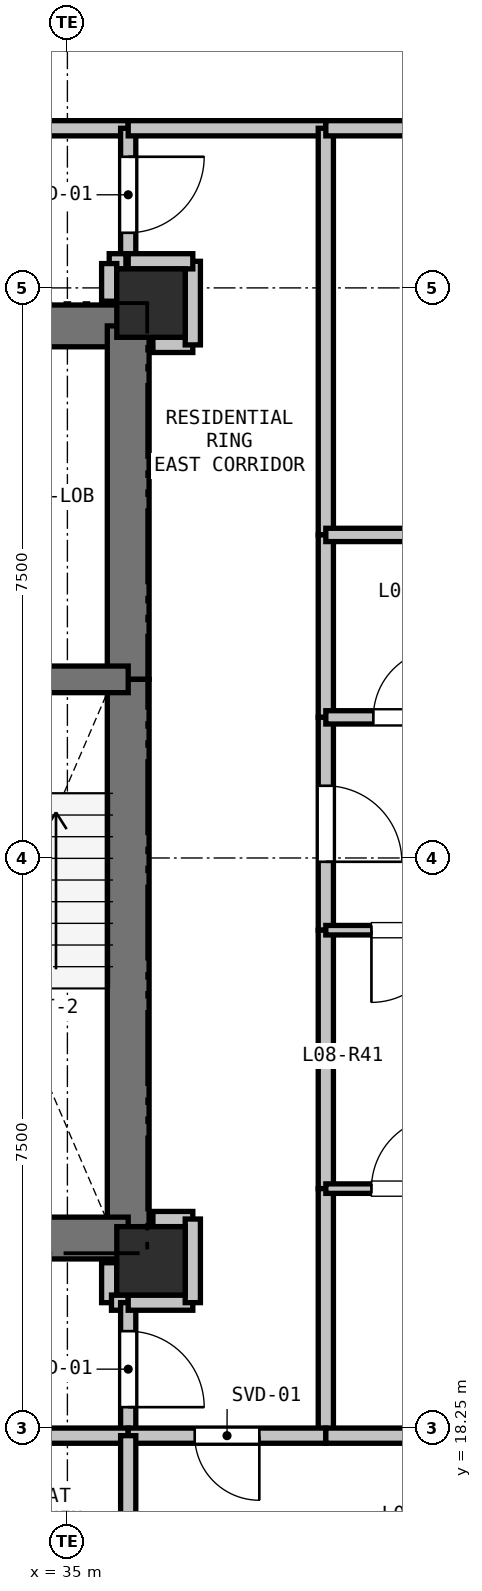
"""IFC4 building model, lengths in metres.
Left out: names, types, materials, properties, quantities, classifications, styles, units other than length and angle.
Written with IfcOpenShell. Run it as: python <this file> out.ifc"""

import sys

from ifc_helpers import new_model, si_unit, direction, frame, frame_2d, origin, origin_2d, place, context, subcontext, project, spatial, rectangle, extrude, element, fill, save


model = new_model("IFC4")
c1 = context("Model", 3, precision=1e-05, world=origin(), true_north=direction((0.0, 1.0)))
c2 = subcontext(c1, "Body", "Model", "MODEL_VIEW")
j1 = project(units=[si_unit("LENGTHUNIT", "METRE"), si_unit("PLANEANGLEUNIT", "RADIAN")], contexts=[c1])
p1 = place(None, origin())
s1 = spatial("IfcSite", under=j1, at=p1, CompositionType="ELEMENT")
p2 = place(p1, origin())
s2 = spatial("IfcBuilding", under=s1, at=p2, CompositionType="ELEMENT")
p3 = place(p2, frame((0.0, 0.0, 32.4)))
s3 = spatial("IfcBuildingStorey", under=s2, at=p3, CompositionType="ELEMENT", Elevation=32.4)
for number, where, z_axis, x_axis in (
    (1, (36.1, 33.05, 0.0), (0.0, 0.0, 1.0), (1.0, 0.0, 0.0)),
    (2, (36.1, 20.45, 0.0), (0.0, 0.0, 1.0), (1.0, 0.0, 0.0)),
):
    element("IfcColumn", number, at=place(p3, frame(where, z_axis=z_axis, x_axis=x_axis)), inside=s3, PredefinedType="COLUMN", context=c2, shape_type="SweptSolid", body=[
        extrude(rectangle(XDim=0.9, YDim=0.9, at=origin_2d()), origin(), (0.0, 0.0, 1.0), 3.3),
    ])
p4 = place(p3, frame((32.35, 32.75, 0.0), z_axis=(0.0, 0.0, 1.0), x_axis=(1.0, 0.0, 0.0)))
e3 = element("IfcWall", 3, at=p4, inside=s3, PredefinedType="SHEAR", context=c2, shape_type="SweptSolid", body=[
    extrude(rectangle(XDim=3.45, YDim=0.55, at=frame_2d((1.725, 0.0))), origin(), (0.0, 0.0, 1.0), 3.04),
])
p5 = place(p4, frame((0.65, 0.0, 0.0)))
e4 = element("IfcOpeningElement", 4, at=p5, cuts=e3, PredefinedType="OPENING", context=c2, shape_type="SweptSolid", body=[
    extrude(rectangle(XDim=1.15, YDim=2.15, at=frame_2d((0.575, 1.075))), frame((0.0, 0.285, 0.0), z_axis=(0.0, -1.0, 0.0), x_axis=(1.0, 0.0, 0.0)), (0.0, 0.0, 1.0), 0.57),
])
p6 = place(p3, frame((35.8, 32.75, 0.0), z_axis=(0.0, 0.0, 1.0), x_axis=(0.0, -1.0, 0.0)))
e5 = element("IfcWall", 5, at=p6, inside=s3, PredefinedType="SHEAR", context=c2, shape_type="SweptSolid", body=[
    extrude(rectangle(XDim=4.65, YDim=0.55, at=frame_2d((2.325, 0.0))), origin(), (0.0, 0.0, 1.0), 3.04),
])
p7 = place(p3, frame((35.8, 28.1, 0.0), z_axis=(0.0, 0.0, 1.0), x_axis=(0.0, -1.0, 0.0)))
e6 = element("IfcWall", 6, at=p7, inside=s3, PredefinedType="SHEAR", context=c2, shape_type="SweptSolid", body=[
    extrude(rectangle(XDim=7.35, YDim=0.55, at=frame_2d((3.675, 0.0))), origin(), (0.0, 0.0, 1.0), 3.04),
])
p8 = place(p3, frame((35.8, 20.75, 0.0), z_axis=(0.0, 0.0, 1.0), x_axis=(-1.0, 0.0, 0.0)))
e7 = element("IfcWall", 7, at=p8, inside=s3, PredefinedType="SHEAR", context=c2, shape_type="SweptSolid", body=[
    extrude(rectangle(XDim=3.45, YDim=0.55, at=frame_2d((1.725, 0.0))), origin(), (0.0, 0.0, 1.0), 3.04),
])
p9 = place(p3, frame((32.35, 28.1, 0.0), z_axis=(0.0, 0.0, 1.0), x_axis=(1.0, 0.0, 0.0)))
e8 = element("IfcWall", 8, at=p9, inside=s3, PredefinedType="SHEAR", context=c2, shape_type="SweptSolid", body=[
    extrude(rectangle(XDim=3.45, YDim=0.35, at=frame_2d((1.725, 0.0))), origin(), (0.0, 0.0, 1.0), 3.04),
])
p10 = place(p9, frame((1.15, 0.0, 0.0)))
e9 = element("IfcOpeningElement", 9, at=p10, cuts=e8, PredefinedType="OPENING", context=c2, shape_type="SweptSolid", body=[
    extrude(rectangle(XDim=1.15, YDim=2.15, at=frame_2d((0.575, 1.075))), frame((0.0, 0.185, 0.0), z_axis=(0.0, -1.0, 0.0), x_axis=(1.0, 0.0, 0.0)), (0.0, 0.0, 1.0), 0.37),
])
p11 = place(p3, frame((35.55, 20.425, 0.0), z_axis=(0.0, 0.0, 1.0), x_axis=(0.0, -1.0, 0.0)))
e10 = element("IfcWall", 10, at=p11, inside=s3, PredefinedType="PARTITIONING", context=c2, shape_type="SweptSolid", body=[
    extrude(rectangle(XDim=0.525, YDim=0.2, at=frame_2d((0.263, 0.0))), origin(), (0.0, 0.0, 1.0), 2.488),
])
p12 = place(p3, frame((35.58, 19.9, 0.0), z_axis=(0.0, 0.0, 1.0), x_axis=(1.0, 0.0, 0.0)))
e11 = element("IfcWall", 11, at=p12, inside=s3, PredefinedType="PARTITIONING", context=c2, shape_type="SweptSolid", body=[
    extrude(rectangle(XDim=0.22, YDim=0.2, at=frame_2d((0.11, 0.0))), origin(), (0.0, 0.0, 1.0), 3.04),
])
p13 = place(p3, frame((35.8, 19.9, 0.0), z_axis=(0.0, 0.0, 1.0), x_axis=(0.0, -1.0, 0.0)))
e12 = element("IfcWall", 12, at=p13, inside=s3, PredefinedType="PARTITIONING", context=c2, shape_type="SweptSolid", body=[
    extrude(rectangle(XDim=1.75, YDim=0.2, at=frame_2d((0.875, 0.0))), origin(), (0.0, 0.0, 1.0), 3.04),
])
p14 = place(p13, frame((0.375, 0.0, 0.0)))
e13 = element("IfcOpeningElement", 13, at=p14, cuts=e12, PredefinedType="OPENING", context=c2, shape_type="SweptSolid", body=[
    extrude(rectangle(XDim=1.0, YDim=2.15, at=frame_2d((0.5, 1.075))), frame((0.0, 0.11, 0.0), z_axis=(0.0, -1.0, 0.0), x_axis=(1.0, 0.0, 0.0)), (0.0, 0.0, 1.0), 0.22),
])
p15 = place(p3, frame((35.8, 18.15, 0.0), z_axis=(0.0, 0.0, 1.0), x_axis=(-1.0, 0.0, 0.0)))
e14 = element("IfcWall", 14, at=p15, inside=s3, PredefinedType="PARTITIONING", context=c2, shape_type="SweptSolid", body=[
    extrude(rectangle(XDim=3.6, YDim=0.2, at=frame_2d((1.8, 0.0))), origin(), (0.0, 0.0, 1.0), 3.04),
])
p16 = place(p3, frame((33.5, 35.35, 0.0), z_axis=(0.0, 0.0, 1.0), x_axis=(1.0, 0.0, 0.0)))
e15 = element("IfcWall", 15, at=p16, inside=s3, PredefinedType="PARTITIONING", context=c2, shape_type="SweptSolid", body=[
    extrude(rectangle(XDim=2.3, YDim=0.2, at=frame_2d((1.15, 0.0))), origin(), (0.0, 0.0, 1.0), 3.04),
])
p17 = place(p3, frame((35.8, 35.35, 0.0), z_axis=(0.0, 0.0, 1.0), x_axis=(0.0, -1.0, 0.0)))
e16 = element("IfcWall", 16, at=p17, inside=s3, PredefinedType="PARTITIONING", context=c2, shape_type="SweptSolid", body=[
    extrude(rectangle(XDim=1.75, YDim=0.2, at=frame_2d((0.875, 0.0))), origin(), (0.0, 0.0, 1.0), 3.04),
])
p18 = place(p17, frame((0.375, 0.0, 0.0)))
e17 = element("IfcOpeningElement", 17, at=p18, cuts=e16, PredefinedType="OPENING", context=c2, shape_type="SweptSolid", body=[
    extrude(rectangle(XDim=1.0, YDim=2.15, at=frame_2d((0.5, 1.075))), frame((0.0, 0.11, 0.0), z_axis=(0.0, -1.0, 0.0), x_axis=(1.0, 0.0, 0.0)), (0.0, 0.0, 1.0), 0.22),
])
p19 = place(p3, frame((35.77, 33.6, 0.0), z_axis=(0.0, 0.0, 1.0), x_axis=(-1.0, 0.0, 0.0)))
e18 = element("IfcWall", 18, at=p19, inside=s3, PredefinedType="PARTITIONING", context=c2, shape_type="SweptSolid", body=[
    extrude(rectangle(XDim=0.22, YDim=0.2, at=frame_2d((0.11, 0.0))), origin(), (0.0, 0.0, 1.0), 3.04),
])
p20 = place(p3, frame((35.55, 33.57, 0.0), z_axis=(0.0, 0.0, 1.0), x_axis=(0.0, -1.0, 0.0)))
e19 = element("IfcWall", 19, at=p20, inside=s3, PredefinedType="PARTITIONING", context=c2, shape_type="SweptSolid", body=[
    extrude(rectangle(XDim=0.495, YDim=0.2, at=frame_2d((0.248, 0.0))), origin(), (0.0, 0.0, 1.0), 2.488),
])
for number, where, z_axis, x_axis in (
    (20, (36.65, 21.0, 0.0), (0.0, 0.0, 1.0), (-1.0, 0.0, 0.0)),
    (21, (36.125, 32.5, 0.0), (0.0, 0.0, 1.0), (1.0, 0.0, 0.0)),
):
    element("IfcWall", number, at=place(p3, frame(where, z_axis=z_axis, x_axis=x_axis)), inside=s3, PredefinedType="PARTITIONING", context=c2, shape_type="SweptSolid", body=[
        extrude(rectangle(XDim=0.525, YDim=0.2, at=frame_2d((0.262, 0.0))), origin(), (0.0, 0.0, 1.0), 2.488),
    ])
p21 = place(p3, frame((36.65, 32.5, 0.0), z_axis=(0.0, 0.0, 1.0), x_axis=(0.0, 1.0, 0.0)))
e22 = element("IfcWall", 22, at=p21, inside=s3, PredefinedType="PARTITIONING", context=c2, shape_type="SweptSolid", body=[
    extrude(rectangle(XDim=1.1, YDim=0.2, at=frame_2d((0.55, 0.0))), origin(), (0.0, 0.0, 1.0), 2.338),
])
p22 = place(p3, frame((36.65, 33.6, 0.0), z_axis=(0.0, 0.0, 1.0), x_axis=(-1.0, 0.0, 0.0)))
e23 = element("IfcWall", 23, at=p22, inside=s3, PredefinedType="PARTITIONING", context=c2, shape_type="SweptSolid", body=[
    extrude(rectangle(XDim=0.85, YDim=0.2, at=frame_2d((0.425, 0.0))), origin(), (0.0, 0.0, 1.0), 2.338),
])
p23 = place(p3, frame((35.8, 35.35, 0.0), z_axis=(0.0, 0.0, 1.0), x_axis=(1.0, 0.0, 0.0)))
e24 = element("IfcWall", 24, at=p23, inside=s3, PredefinedType="PARTITIONING", context=c2, shape_type="SweptSolid", body=[
    extrude(rectangle(XDim=2.6, YDim=0.2, at=frame_2d((1.3, 0.0))), origin(), (0.0, 0.0, 1.0), 2.338),
])
p24 = place(p3, frame((38.4, 35.35, 0.0), z_axis=(0.0, 0.0, 1.0), x_axis=(0.0, -1.0, 0.0)))
e25 = element("IfcWall", 25, at=p24, inside=s3, PredefinedType="PARTITIONING", context=c2, shape_type="SweptSolid", body=[
    extrude(rectangle(XDim=5.35, YDim=0.2, at=frame_2d((2.675, 0.0))), origin(), (0.0, 0.0, 1.0), 2.338),
])
p25 = place(p3, frame((38.4, 30.0, 0.0), z_axis=(0.0, 0.0, 1.0), x_axis=(0.0, -1.0, 0.0)))
e26 = element("IfcWall", 26, at=p25, inside=s3, PredefinedType="PARTITIONING", context=c2, shape_type="SweptSolid", body=[
    extrude(rectangle(XDim=2.4, YDim=0.2, at=frame_2d((1.2, 0.0))), origin(), (0.0, 0.0, 1.0), 3.04),
])
p26 = place(p3, frame((38.4, 27.6, 0.0), z_axis=(0.0, 0.0, 1.0), x_axis=(0.0, -1.0, 0.0)))
e27 = element("IfcWall", 27, at=p26, inside=s3, PredefinedType="PARTITIONING", context=c2, shape_type="SweptSolid", body=[
    extrude(rectangle(XDim=2.8, YDim=0.2, at=frame_2d((1.4, 0.0))), origin(), (0.0, 0.0, 1.0), 3.04),
])
p27 = place(p26, frame((0.9, 0.0, 0.0)))
e28 = element("IfcOpeningElement", 28, at=p27, cuts=e27, PredefinedType="OPENING", context=c2, shape_type="SweptSolid", body=[
    extrude(rectangle(XDim=1.0, YDim=2.15, at=frame_2d((0.5, 1.075))), frame((0.0, 0.11, 0.0), z_axis=(0.0, -1.0, 0.0), x_axis=(1.0, 0.0, 0.0)), (0.0, 0.0, 1.0), 0.22),
])
p28 = place(p3, frame((38.4, 24.8, 0.0), z_axis=(0.0, 0.0, 1.0), x_axis=(0.0, -1.0, 0.0)))
e29 = element("IfcWall", 29, at=p28, inside=s3, PredefinedType="PARTITIONING", context=c2, shape_type="SweptSolid", body=[
    extrude(rectangle(XDim=3.4, YDim=0.2, at=frame_2d((1.7, 0.0))), origin(), (0.0, 0.0, 1.0), 3.04),
])
p29 = place(p3, frame((38.4, 21.4, 0.0), z_axis=(0.0, 0.0, 1.0), x_axis=(0.0, -1.0, 0.0)))
e30 = element("IfcWall", 30, at=p29, inside=s3, PredefinedType="PARTITIONING", context=c2, shape_type="SweptSolid", body=[
    extrude(rectangle(XDim=3.25, YDim=0.2, at=frame_2d((1.625, 0.0))), origin(), (0.0, 0.0, 1.0), 3.04),
])
p30 = place(p3, frame((38.4, 18.15, 0.0), z_axis=(0.0, 0.0, 1.0), x_axis=(-1.0, 0.0, 0.0)))
e31 = element("IfcWall", 31, at=p30, inside=s3, PredefinedType="PARTITIONING", context=c2, shape_type="SweptSolid", body=[
    extrude(rectangle(XDim=2.6, YDim=0.2, at=frame_2d((1.3, 0.0))), origin(), (0.0, 0.0, 1.0), 2.338),
])
p31 = place(p30, frame((0.875, 0.0, 0.0)))
e32 = element("IfcOpeningElement", 32, at=p31, cuts=e31, PredefinedType="OPENING", context=c2, shape_type="SweptSolid", body=[
    extrude(rectangle(XDim=0.85, YDim=2.1, at=frame_2d((0.425, 1.05))), frame((0.0, 0.11, 0.0), z_axis=(0.0, -1.0, 0.0), x_axis=(1.0, 0.0, 0.0)), (0.0, 0.0, 1.0), 0.22),
])
p32 = place(p3, frame((35.8, 19.9, 0.0), z_axis=(0.0, 0.0, 1.0), x_axis=(1.0, 0.0, 0.0)))
e33 = element("IfcWall", 33, at=p32, inside=s3, PredefinedType="PARTITIONING", context=c2, shape_type="SweptSolid", body=[
    extrude(rectangle(XDim=0.85, YDim=0.2, at=frame_2d((0.425, 0.0))), origin(), (0.0, 0.0, 1.0), 2.338),
])
p33 = place(p3, frame((36.65, 19.9, 0.0), z_axis=(0.0, 0.0, 1.0), x_axis=(0.0, 1.0, 0.0)))
e34 = element("IfcWall", 34, at=p33, inside=s3, PredefinedType="PARTITIONING", context=c2, shape_type="SweptSolid", body=[
    extrude(rectangle(XDim=1.1, YDim=0.2, at=frame_2d((0.55, 0.0))), origin(), (0.0, 0.0, 1.0), 3.04),
])
p34 = place(p3, frame((40.55, 24.8, 0.0), z_axis=(0.0, 0.0, 1.0), x_axis=(-1.0, 0.0, 0.0)))
e35 = element("IfcWall", 35, at=p34, inside=s3, PredefinedType="PARTITIONING", context=c2, shape_type="SweptSolid", body=[
    extrude(rectangle(XDim=2.15, YDim=0.125, at=frame_2d((1.075, 0.0))), origin(), (0.0, 0.0, 1.0), 3.04),
])
p35 = place(p34, frame((0.6, 0.0, 0.0)))
e36 = element("IfcOpeningElement", 36, at=p35, cuts=e35, PredefinedType="OPENING", context=c2, shape_type="SweptSolid", body=[
    extrude(rectangle(XDim=0.95, YDim=2.1, at=frame_2d((0.475, 1.05))), frame((0.0, 0.073, 0.0), z_axis=(0.0, -1.0, 0.0), x_axis=(1.0, 0.0, 0.0)), (0.0, 0.0, 1.0), 0.145),
])
p36 = place(p3, frame((38.4, 27.6, 0.0), z_axis=(0.0, 0.0, 1.0), x_axis=(1.0, 0.0, 0.0)))
e37 = element("IfcWall", 37, at=p36, inside=s3, PredefinedType="PLUMBINGWALL", context=c2, shape_type="SweptSolid", body=[
    extrude(rectangle(XDim=2.15, YDim=0.175, at=frame_2d((1.075, 0.0))), origin(), (0.0, 0.0, 1.0), 3.04),
])
p37 = place(p36, frame((0.625, 0.0, 0.0)))
e38 = element("IfcOpeningElement", 38, at=p37, cuts=e37, PredefinedType="OPENING", context=c2, shape_type="SweptSolid", body=[
    extrude(rectangle(XDim=0.9, YDim=2.1, at=frame_2d((0.45, 1.05))), frame((0.0, 0.097, 0.0), z_axis=(0.0, -1.0, 0.0), x_axis=(1.0, 0.0, 0.0)), (0.0, 0.0, 1.0), 0.195),
])
p38 = place(p3, frame((43.688, 35.35, 0.0), z_axis=(0.0, 0.0, 1.0), x_axis=(-1.0, 0.0, 0.0)))
e39 = element("IfcWall", 39, at=p38, inside=s3, PredefinedType="PARTITIONING", context=c2, shape_type="SweptSolid", body=[
    extrude(rectangle(XDim=5.289, YDim=0.2, at=frame_2d((2.644, 0.0))), origin(), (0.0, 0.0, 1.0), 2.338),
])
p39 = place(p3, frame((35.8, 18.15, 0.0), z_axis=(0.0, 0.0, 1.0), x_axis=(0.0, -1.0, 0.0)))
e40 = element("IfcWall", 40, at=p39, inside=s3, PredefinedType="PARTITIONING", context=c2, shape_type="SweptSolid", body=[
    extrude(rectangle(XDim=2.7, YDim=0.2, at=frame_2d((1.35, 0.0))), origin(), (0.0, 0.0, 1.0), 3.04),
])
p40 = place(p3, frame((38.4, 30.0, 0.0), z_axis=(0.0, 0.0, 1.0), x_axis=(1.0, 0.0, 0.0)))
e41 = element("IfcWall", 41, at=p40, inside=s3, PredefinedType="PLUMBINGWALL", context=c2, shape_type="SweptSolid", body=[
    extrude(rectangle(XDim=2.15, YDim=0.175, at=frame_2d((1.075, 0.0))), origin(), (0.0, 0.0, 1.0), 3.04),
])
p41 = place(p3, frame((38.4, 21.4, 0.0), z_axis=(0.0, 0.0, 1.0), x_axis=(1.0, 0.0, 0.0)))
e42 = element("IfcWall", 42, at=p41, inside=s3, PredefinedType="PARTITIONING", context=c2, shape_type="SweptSolid", body=[
    extrude(rectangle(XDim=2.15, YDim=0.125, at=frame_2d((1.075, 0.0))), origin(), (0.0, 0.0, 1.0), 3.04),
])
p42 = place(p41, frame((0.6, 0.0, 0.0)))
e43 = element("IfcOpeningElement", 43, at=p42, cuts=e42, PredefinedType="OPENING", context=c2, shape_type="SweptSolid", body=[
    extrude(rectangle(XDim=0.95, YDim=2.1, at=frame_2d((0.475, 1.05))), frame((0.0, 0.073, 0.0), z_axis=(0.0, -1.0, 0.0), x_axis=(1.0, 0.0, 0.0)), (0.0, 0.0, 1.0), 0.145),
])
p43 = place(p3, frame((43.688, 18.15, 0.0), z_axis=(0.0, 0.0, 1.0), x_axis=(-1.0, 0.0, 0.0)))
e44 = element("IfcWall", 44, at=p43, inside=s3, PredefinedType="PARTITIONING", context=c2, shape_type="SweptSolid", body=[
    extrude(rectangle(XDim=5.289, YDim=0.2, at=frame_2d((2.644, 0.0))), origin(), (0.0, 0.0, 1.0), 2.365),
])
p44 = place(p14, origin())
e45 = element("IfcDoor", 45, at=p44, inside=s3, OperationType="SINGLE_SWING_RIGHT", PredefinedType="DOOR", context=c2, shape_type="SweptSolid", body=[
    extrude(rectangle(XDim=1.0, YDim=2.15, at=frame_2d((0.5, 1.075))), frame((0.0, 0.025, 0.0), z_axis=(0.0, -1.0, 0.0), x_axis=(1.0, 0.0, 0.0)), (0.0, 0.0, 1.0), 0.05),
])
fill(e13, e45)
p45 = place(p18, origin())
e46 = element("IfcDoor", 46, at=p45, inside=s3, OperationType="SINGLE_SWING_LEFT", PredefinedType="DOOR", context=c2, shape_type="SweptSolid", body=[
    extrude(rectangle(XDim=1.0, YDim=2.15, at=frame_2d((0.5, 1.075))), frame((0.0, 0.025, 0.0), z_axis=(0.0, -1.0, 0.0), x_axis=(1.0, 0.0, 0.0)), (0.0, 0.0, 1.0), 0.05),
])
fill(e17, e46)
p46 = place(p27, origin())
e47 = element("IfcDoor", 47, at=p46, inside=s3, OperationType="SINGLE_SWING_RIGHT", PredefinedType="DOOR", context=c2, shape_type="SweptSolid", body=[
    extrude(rectangle(XDim=1.0, YDim=2.15, at=frame_2d((0.5, 1.075))), frame((0.0, 0.025, 0.0), z_axis=(0.0, -1.0, 0.0), x_axis=(1.0, 0.0, 0.0)), (0.0, 0.0, 1.0), 0.05),
])
fill(e28, e47)
p47 = place(p31, origin())
e48 = element("IfcDoor", 48, at=p47, inside=s3, OperationType="SINGLE_SWING_LEFT", PredefinedType="DOOR", context=c2, shape_type="SweptSolid", body=[
    extrude(rectangle(XDim=0.85, YDim=2.1, at=frame_2d((0.425, 1.05))), frame((0.0, 0.025, 0.0), z_axis=(0.0, -1.0, 0.0), x_axis=(1.0, 0.0, 0.0)), (0.0, 0.0, 1.0), 0.05),
])
fill(e32, e48)
p48 = place(p37, origin())
e49 = element("IfcDoor", 49, at=p48, inside=s3, OperationType="SINGLE_SWING_RIGHT", PredefinedType="DOOR", context=c2, shape_type="SweptSolid", body=[
    extrude(rectangle(XDim=0.9, YDim=2.1, at=frame_2d((0.45, 1.05))), frame((0.0, 0.025, 0.0), z_axis=(0.0, -1.0, 0.0), x_axis=(1.0, 0.0, 0.0)), (0.0, 0.0, 1.0), 0.05),
])
fill(e38, e49)
p49 = place(p35, origin())
e50 = element("IfcDoor", 50, at=p49, inside=s3, OperationType="SINGLE_SWING_RIGHT", PredefinedType="DOOR", context=c2, shape_type="SweptSolid", body=[
    extrude(rectangle(XDim=0.95, YDim=2.1, at=frame_2d((0.475, 1.05))), frame((0.0, 0.025, 0.0), z_axis=(0.0, -1.0, 0.0), x_axis=(1.0, 0.0, 0.0)), (0.0, 0.0, 1.0), 0.05),
])
fill(e36, e50)
p50 = place(p42, origin())
e51 = element("IfcDoor", 51, at=p50, inside=s3, OperationType="SINGLE_SWING_RIGHT", PredefinedType="DOOR", context=c2, shape_type="SweptSolid", body=[
    extrude(rectangle(XDim=0.95, YDim=2.1, at=frame_2d((0.475, 1.05))), frame((0.0, 0.025, 0.0), z_axis=(0.0, -1.0, 0.0), x_axis=(1.0, 0.0, 0.0)), (0.0, 0.0, 1.0), 0.05),
])
fill(e43, e51)
save(model, sys.argv[1])
